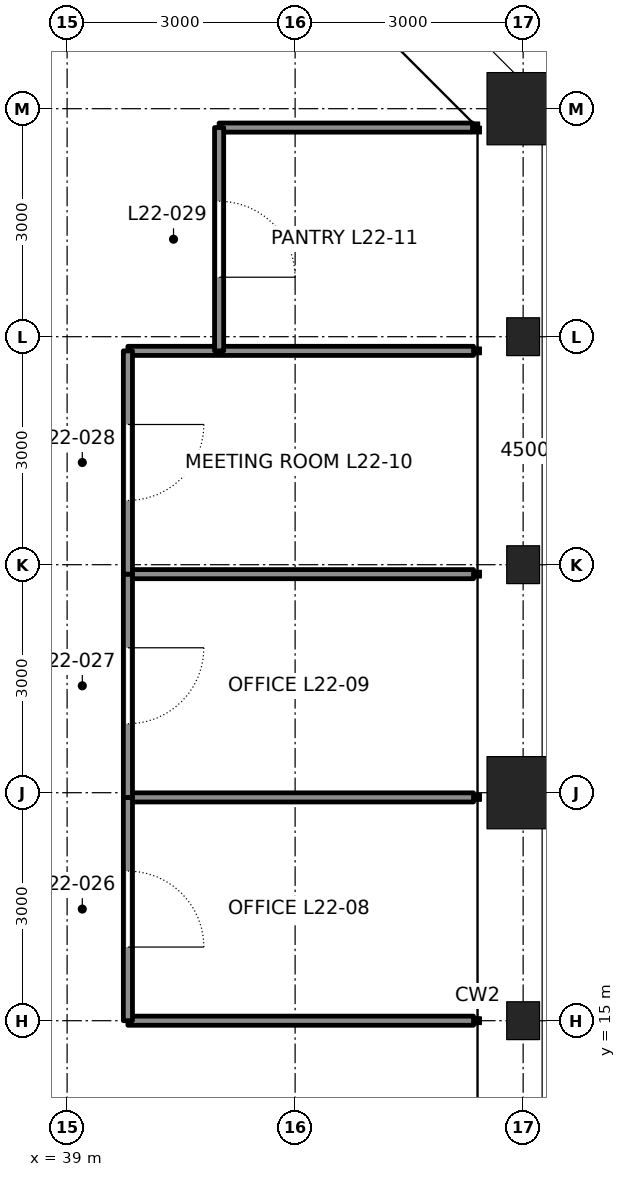
"""IFC4 building model, lengths in metres.
Left out: names, types, materials, properties, quantities, classifications, styles, units other than length and angle.
Written with IfcOpenShell. Run it as: python <this file> out.ifc"""

import sys

from ifc_helpers import new_model, si_unit, direction, frame, frame_2d, origin, origin_2d, place, context, subcontext, project, spatial, rectangle, hollow_rectangle, i_section, extrude, element, fill, save


model = new_model("IFC4")
c1 = context("Model", 3, precision=1e-05, world=origin(), true_north=direction((0.0, 1.0)))
c2 = subcontext(c1, "Body", "Model", "MODEL_VIEW")
j1 = project(units=[si_unit("LENGTHUNIT", "METRE"), si_unit("PLANEANGLEUNIT", "RADIAN")], contexts=[c1])
p1 = place(None, origin())
s1 = spatial("IfcSite", under=j1, at=p1, CompositionType="ELEMENT")
p2 = place(p1, origin())
s2 = spatial("IfcBuilding", under=s1, at=p2, CompositionType="ELEMENT")
p3 = place(p2, frame((0.0, 0.0, 106.8)))
s3 = spatial("IfcBuildingStorey", under=s2, at=p3, CompositionType="ELEMENT", Elevation=106.8)
p4 = place(p3, frame((45.0, 15.0, 0.0), z_axis=(0.0, 0.0, 1.0), x_axis=(1.0, 0.0, 0.0)))
e1 = element("IfcColumn", 1, at=p4, inside=s3, PredefinedType="COLUMN", context=c2, shape_type="SweptSolid", body=[
    extrude(i_section(OverallWidth=0.432, OverallDepth=0.498, WebThickness=0.056, FlangeThickness=0.089, at=origin_2d()), origin(), (0.0, 0.0, 1.0), 4.2),
])
p5 = place(p3, frame((45.0, 18.0, 0.0), z_axis=(0.0, 0.0, 1.0), x_axis=(1.0, 0.0, 0.0)))
e2 = element("IfcColumn", 2, at=p5, inside=s3, PredefinedType="COLUMN", context=c2, shape_type="SweptSolid", body=[
    extrude(hollow_rectangle(XDim=0.95, YDim=0.95, WallThickness=0.11, at=origin_2d()), origin(), (0.0, 0.0, 1.0), 4.2),
])
for number, where, z_axis, x_axis in (
    (3, (45.0, 21.0, 0.0), (0.0, 0.0, 1.0), (1.0, 0.0, 0.0)),
    (4, (45.0, 24.0, 0.0), (0.0, 0.0, 1.0), (1.0, 0.0, 0.0)),
):
    element("IfcColumn", number, at=place(p3, frame(where, z_axis=z_axis, x_axis=x_axis)), inside=s3, PredefinedType="COLUMN", context=c2, shape_type="SweptSolid", body=[
        extrude(i_section(OverallWidth=0.432, OverallDepth=0.498, WebThickness=0.056, FlangeThickness=0.089, at=origin_2d()), origin(), (0.0, 0.0, 1.0), 4.2),
    ])
p6 = place(p3, frame((45.0, 27.0, 0.0), z_axis=(0.0, 0.0, 1.0), x_axis=(1.0, 0.0, 0.0)))
e5 = element("IfcColumn", 5, at=p6, inside=s3, PredefinedType="COLUMN", context=c2, shape_type="SweptSolid", body=[
    extrude(hollow_rectangle(XDim=0.95, YDim=0.95, WallThickness=0.095, at=origin_2d()), origin(), (0.0, 0.0, 1.0), 4.2),
])
for number, where, z_axis, x_axis in (
    (6, (44.347, 15.0, 0.0), (0.0, 0.0, 1.0), (-1.0, 0.0, 0.0)),
    (7, (44.347, 17.938, 0.0), (0.0, 0.0, 1.0), (-1.0, 0.0, 0.0)),
    (8, (44.347, 20.876, 0.0), (0.0, 0.0, 1.0), (-1.0, 0.0, 0.0)),
):
    element("IfcWall", number, at=place(p3, frame(where, z_axis=z_axis, x_axis=x_axis)), inside=s3, PredefinedType="PARTITIONING", context=c2, shape_type="SweptSolid", body=[
        extrude(rectangle(XDim=4.547, YDim=0.12, at=frame_2d((2.274, 0.0))), origin(), (0.0, 0.0, 1.0), 3.357),
    ])
p7 = place(p3, frame((44.347, 23.814, 0.0), z_axis=(0.0, 0.0, 1.0), x_axis=(-1.0, 0.0, 0.0)))
e9 = element("IfcWall", 9, at=p7, inside=s3, PredefinedType="PARTITIONING", context=c2, shape_type="SweptSolid", body=[
    extrude(rectangle(XDim=4.547, YDim=0.12, at=frame_2d((2.274, 0.0))), origin(), (0.0, 0.0, 1.0), 4.04),
])
p8 = place(p3, frame((44.334, 26.751, 0.0), z_axis=(0.0, 0.0, 1.0), x_axis=(-1.0, 0.0, 0.0)))
e10 = element("IfcWall", 10, at=p8, inside=s3, PredefinedType="PARTITIONING", context=c2, shape_type="SweptSolid", body=[
    extrude(rectangle(XDim=3.334, YDim=0.12, at=frame_2d((1.667, 0.0))), origin(), (0.0, 0.0, 1.0), 4.04),
])
p9 = place(p3, frame((39.8, 15.0, 0.0), z_axis=(0.0, 0.0, 1.0), x_axis=(0.0, 1.0, 0.0)))
e11 = element("IfcWall", 11, at=p9, inside=s3, PredefinedType="PARTITIONING", context=c2, shape_type="SweptSolid", body=[
    extrude(rectangle(XDim=2.938, YDim=0.12, at=frame_2d((1.469, 0.0))), origin(), (0.0, 0.0, 1.0), 4.04),
])
p10 = place(p9, frame((0.969, 0.0, 0.0)))
e12 = element("IfcOpeningElement", 12, at=p10, cuts=e11, PredefinedType="OPENING", context=c2, shape_type="SweptSolid", body=[
    extrude(rectangle(XDim=1.0, YDim=2.4, at=frame_2d((0.5, 1.2))), frame((0.0, 0.07, 0.0), z_axis=(0.0, -1.0, 0.0), x_axis=(1.0, 0.0, 0.0)), (0.0, 0.0, 1.0), 0.14),
])
p11 = place(p3, frame((39.8, 17.938, 0.0), z_axis=(0.0, 0.0, 1.0), x_axis=(0.0, 1.0, 0.0)))
e13 = element("IfcWall", 13, at=p11, inside=s3, PredefinedType="PARTITIONING", context=c2, shape_type="SweptSolid", body=[
    extrude(rectangle(XDim=2.938, YDim=0.12, at=frame_2d((1.469, 0.0))), origin(), (0.0, 0.0, 1.0), 4.04),
])
p12 = place(p11, frame((0.969, 0.0, 0.0)))
e14 = element("IfcOpeningElement", 14, at=p12, cuts=e13, PredefinedType="OPENING", context=c2, shape_type="SweptSolid", body=[
    extrude(rectangle(XDim=1.0, YDim=2.4, at=frame_2d((0.5, 1.2))), frame((0.0, 0.07, 0.0), z_axis=(0.0, -1.0, 0.0), x_axis=(1.0, 0.0, 0.0)), (0.0, 0.0, 1.0), 0.14),
])
p13 = place(p3, frame((39.8, 20.876, 0.0), z_axis=(0.0, 0.0, 1.0), x_axis=(0.0, 1.0, 0.0)))
e15 = element("IfcWall", 15, at=p13, inside=s3, PredefinedType="PARTITIONING", context=c2, shape_type="SweptSolid", body=[
    extrude(rectangle(XDim=2.938, YDim=0.12, at=frame_2d((1.469, 0.0))), origin(), (0.0, 0.0, 1.0), 4.04),
])
p14 = place(p13, frame((0.969, 0.0, 0.0)))
e16 = element("IfcOpeningElement", 16, at=p14, cuts=e15, PredefinedType="OPENING", context=c2, shape_type="SweptSolid", body=[
    extrude(rectangle(XDim=1.0, YDim=2.4, at=frame_2d((0.5, 1.2))), frame((0.0, 0.07, 0.0), z_axis=(0.0, -1.0, 0.0), x_axis=(1.0, 0.0, 0.0)), (0.0, 0.0, 1.0), 0.14),
])
p15 = place(p3, frame((41.0, 23.814, 0.0), z_axis=(0.0, 0.0, 1.0), x_axis=(0.0, 1.0, 0.0)))
e17 = element("IfcWall", 17, at=p15, inside=s3, PredefinedType="PARTITIONING", context=c2, shape_type="SweptSolid", body=[
    extrude(rectangle(XDim=2.938, YDim=0.12, at=frame_2d((1.469, 0.0))), origin(), (0.0, 0.0, 1.0), 4.04),
])
p16 = place(p15, frame((0.969, 0.0, 0.0)))
e18 = element("IfcOpeningElement", 18, at=p16, cuts=e17, PredefinedType="OPENING", context=c2, shape_type="SweptSolid", body=[
    extrude(rectangle(XDim=1.0, YDim=2.4, at=frame_2d((0.5, 1.2))), frame((0.0, 0.07, 0.0), z_axis=(0.0, -1.0, 0.0), x_axis=(1.0, 0.0, 0.0)), (0.0, 0.0, 1.0), 0.14),
])
p17 = place(p10, frame((1.0, 0.0, 0.0), z_axis=(0.0, 0.0, 1.0), x_axis=(-1.0, 0.0, 0.0)))
e19 = element("IfcDoor", 19, at=p17, inside=s3, OperationType="SINGLE_SWING_RIGHT", PredefinedType="DOOR", context=c2, shape_type="SweptSolid", body=[
    extrude(rectangle(XDim=1.0, YDim=2.4, at=frame_2d((0.5, 1.2))), frame((0.0, 0.025, 0.0), z_axis=(0.0, -1.0, 0.0), x_axis=(1.0, 0.0, 0.0)), (0.0, 0.0, 1.0), 0.05),
])
fill(e12, e19)
p18 = place(p12, frame((1.0, 0.0, 0.0), z_axis=(0.0, 0.0, 1.0), x_axis=(-1.0, 0.0, 0.0)))
e20 = element("IfcDoor", 20, at=p18, inside=s3, OperationType="SINGLE_SWING_LEFT", PredefinedType="DOOR", context=c2, shape_type="SweptSolid", body=[
    extrude(rectangle(XDim=1.0, YDim=2.4, at=frame_2d((0.5, 1.2))), frame((0.0, 0.025, 0.0), z_axis=(0.0, -1.0, 0.0), x_axis=(1.0, 0.0, 0.0)), (0.0, 0.0, 1.0), 0.05),
])
fill(e14, e20)
p19 = place(p14, frame((1.0, 0.0, 0.0), z_axis=(0.0, 0.0, 1.0), x_axis=(-1.0, 0.0, 0.0)))
e21 = element("IfcDoor", 21, at=p19, inside=s3, OperationType="SINGLE_SWING_LEFT", PredefinedType="DOOR", context=c2, shape_type="SweptSolid", body=[
    extrude(rectangle(XDim=1.0, YDim=2.4, at=frame_2d((0.5, 1.2))), frame((0.0, 0.025, 0.0), z_axis=(0.0, -1.0, 0.0), x_axis=(1.0, 0.0, 0.0)), (0.0, 0.0, 1.0), 0.05),
])
fill(e16, e21)
p20 = place(p16, frame((1.0, 0.0, 0.0), z_axis=(0.0, 0.0, 1.0), x_axis=(-1.0, 0.0, 0.0)))
e22 = element("IfcDoor", 22, at=p20, inside=s3, OperationType="SINGLE_SWING_RIGHT", PredefinedType="DOOR", context=c2, shape_type="SweptSolid", body=[
    extrude(rectangle(XDim=1.0, YDim=2.4, at=frame_2d((0.5, 1.2))), frame((0.0, 0.025, 0.0), z_axis=(0.0, -1.0, 0.0), x_axis=(1.0, 0.0, 0.0)), (0.0, 0.0, 1.0), 0.05),
])
fill(e18, e22)
save(model, sys.argv[1])
